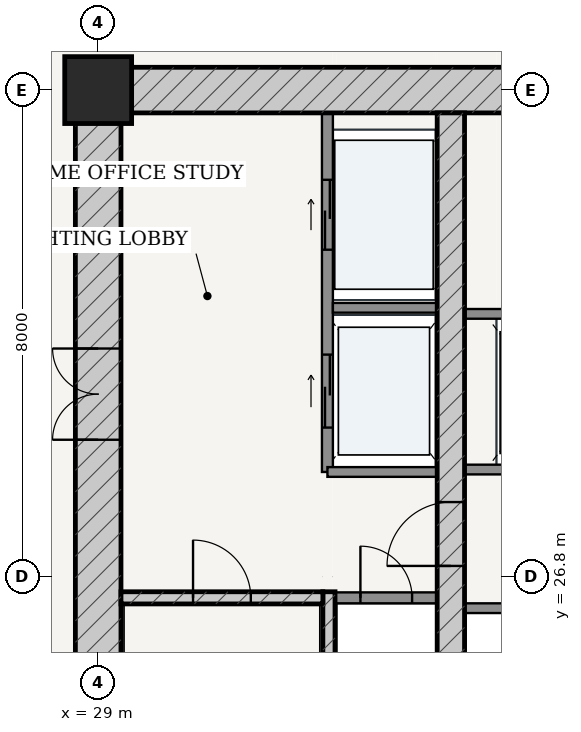
"""IFC4 building model, lengths in metres.
Left out: names, types, materials, properties, quantities, classifications, styles, units other than length and angle.
Written with IfcOpenShell. Run it as: python <this file> out.ifc"""

import sys

from ifc_helpers import new_model, si_unit, direction, frame, frame_2d, origin, origin_2d, place, context, subcontext, project, spatial, rectangle, extrude, source, transform, mapped, element, fill, save


model = new_model("IFC4")
c1 = context("Model", 3, precision=1e-05, world=origin(), true_north=direction((-0.2419218956, 0.970295726276)))
c2 = subcontext(c1, "Body", "Model", "MODEL_VIEW")
j1 = project(units=[si_unit("LENGTHUNIT", "METRE"), si_unit("PLANEANGLEUNIT", "RADIAN")], contexts=[c1])
p1 = place(None, origin())
s1 = spatial("IfcSite", under=j1, at=p1, CompositionType="ELEMENT")
p2 = place(p1, origin())
s2 = spatial("IfcBuilding", under=s1, at=p2, CompositionType="ELEMENT")
p3 = place(p2, frame((0.0, 0.0, 42.0)))
s3 = spatial("IfcBuildingStorey", under=s2, at=p3, CompositionType="ELEMENT", Elevation=42.0)
p4 = place(p3, frame((29.0, 34.8, 0.0), z_axis=(0.0, 0.0, 1.0), x_axis=(1.0, 0.0, 0.0)))
e1 = element("IfcColumn", 1, at=p4, inside=s3, PredefinedType="COLUMN", context=c2, shape_type="SweptSolid", body=[
    extrude(rectangle(XDim=1.1, YDim=1.1, at=origin_2d()), origin(), (0.0, 0.0, 1.0), 3.6),
])
p5 = place(p3, frame((28.625, 34.8, 0.0), z_axis=(0.0, 0.0, 1.0), x_axis=(1.0, 0.0, 0.0)))
e2 = element("IfcWall", 2, at=p5, inside=s3, PredefinedType="SHEAR", context=c2, shape_type="SweptSolid", body=[
    extrude(rectangle(XDim=18.75, YDim=0.75, at=frame_2d((9.375, 0.0))), origin(), (0.0, 0.0, 1.0), 3.32),
])
p6 = place(p5, frame((7.407, 0.0, 0.0)))
e3 = element("IfcOpeningElement", 3, at=p6, cuts=e2, PredefinedType="OPENING", context=c2, shape_type="SweptSolid", body=[
    extrude(rectangle(XDim=0.86, YDim=2.1, at=frame_2d((0.43, 1.05))), frame((0.0, 0.385, 0.0), z_axis=(0.0, -1.0, 0.0), x_axis=(1.0, 0.0, 0.0)), (0.0, 0.0, 1.0), 0.77),
])
p7 = place(p5, frame((10.488, 0.0, 0.0)))
e4 = element("IfcOpeningElement", 4, at=p7, cuts=e2, PredefinedType="OPENING", context=c2, shape_type="SweptSolid", body=[
    extrude(rectangle(XDim=0.85, YDim=2.1, at=frame_2d((0.425, 1.05))), frame((0.0, 0.385, 0.0), z_axis=(0.0, -1.0, 0.0), x_axis=(1.0, 0.0, 0.0)), (0.0, 0.0, 1.0), 0.77),
])
p8 = place(p3, frame((29.0, 19.175, 0.0), z_axis=(0.0, 0.0, 1.0), x_axis=(0.0, 1.0, 0.0)))
e5 = element("IfcWall", 5, at=p8, inside=s3, PredefinedType="SHEAR", context=c2, shape_type="SweptSolid", body=[
    extrude(rectangle(XDim=15.25, YDim=0.75, at=frame_2d((7.625, 0.0))), origin(), (0.0, 0.0, 1.0), 3.32),
])
p9 = place(p8, frame((9.875, 0.0, 0.0)))
e6 = element("IfcOpeningElement", 6, at=p9, cuts=e5, PredefinedType="OPENING", context=c2, shape_type="SweptSolid", body=[
    extrude(rectangle(XDim=1.5, YDim=2.2, at=frame_2d((0.75, 1.1))), frame((0.0, 0.385, 0.0), z_axis=(0.0, -1.0, 0.0), x_axis=(1.0, 0.0, 0.0)), (0.0, 0.0, 1.0), 0.77),
])
p10 = place(p3, frame((32.795, 19.175, 0.0), z_axis=(0.0, 0.0, 1.0), x_axis=(0.0, 1.0, 0.0)))
e7 = element("IfcWall", 7, at=p10, inside=s3, PredefinedType="SOLIDWALL", context=c2, shape_type="SweptSolid", body=[
    extrude(rectangle(XDim=7.375, YDim=0.2, at=frame_2d((3.688, 0.0))), origin(), (0.0, 0.0, 1.0), 3.32),
])
p11 = place(p3, frame((29.375, 26.45, 0.0), z_axis=(0.0, 0.0, 1.0), x_axis=(1.0, 0.0, 0.0)))
e8 = element("IfcWall", 8, at=p11, inside=s3, PredefinedType="SOLIDWALL", context=c2, shape_type="SweptSolid", body=[
    extrude(rectangle(XDim=3.32, YDim=0.2, at=frame_2d((1.66, 0.0))), origin(), (0.0, 0.0, 1.0), 3.32),
])
p12 = place(p11, frame((1.185, 0.0, 0.0)))
e9 = element("IfcOpeningElement", 9, at=p12, cuts=e8, PredefinedType="OPENING", context=c2, shape_type="SweptSolid", body=[
    extrude(rectangle(XDim=0.95, YDim=2.15, at=frame_2d((0.475, 1.075))), frame((0.0, 0.11, 0.0), z_axis=(0.0, -1.0, 0.0), x_axis=(1.0, 0.0, 0.0)), (0.0, 0.0, 1.0), 0.22),
])
p13 = place(p3, frame((34.8, 19.175, 0.0), z_axis=(0.0, 0.0, 1.0), x_axis=(0.0, 1.0, 0.0)))
e10 = element("IfcWall", 10, at=p13, inside=s3, PredefinedType="SHEAR", context=c2, shape_type="SweptSolid", body=[
    extrude(rectangle(XDim=15.25, YDim=0.45, at=frame_2d((7.625, 0.0))), origin(), (0.0, 0.0, 1.0), 3.32),
])
p14 = place(p13, frame((7.8, 0.0, 0.0)))
e11 = element("IfcOpeningElement", 11, at=p14, cuts=e10, PredefinedType="OPENING", context=c2, shape_type="SweptSolid", body=[
    extrude(rectangle(XDim=1.05, YDim=2.15, at=frame_2d((0.525, 1.075))), frame((0.0, 0.235, 0.0), z_axis=(0.0, -1.0, 0.0), x_axis=(1.0, 0.0, 0.0)), (0.0, 0.0, 1.0), 0.47),
])
p15 = place(p3, frame((32.9, 26.45, 0.0), z_axis=(0.0, 0.0, 1.0), x_axis=(1.0, 0.0, 0.0)))
e12 = element("IfcWall", 12, at=p15, inside=s3, PredefinedType="PARTITIONING", context=c2, shape_type="SweptSolid", body=[
    extrude(rectangle(XDim=1.675, YDim=0.18, at=frame_2d((0.837, 0.0))), origin(), (0.0, 0.0, 1.0), 3.32),
])
p16 = place(p15, frame((0.413, 0.0, 0.0)))
e13 = element("IfcOpeningElement", 13, at=p16, cuts=e12, PredefinedType="OPENING", context=c2, shape_type="SweptSolid", body=[
    extrude(rectangle(XDim=0.85, YDim=2.1, at=frame_2d((0.425, 1.05))), frame((0.0, 0.1, 0.0), z_axis=(0.0, -1.0, 0.0), x_axis=(1.0, 0.0, 0.0)), (0.0, 0.0, 1.0), 0.2),
])
p17 = place(p3, frame((32.77, 28.52, 0.0), z_axis=(0.0, 0.0, 1.0), x_axis=(0.0, 1.0, 0.0)))
e14 = element("IfcWall", 14, at=p17, inside=s3, PredefinedType="PARTITIONING", context=c2, shape_type="SweptSolid", body=[
    extrude(rectangle(XDim=5.905, YDim=0.18, at=frame_2d((2.953, 0.0))), origin(), (0.0, 0.0, 1.0), 3.32),
])
p18 = place(p17, frame((3.655, 0.0, 0.0)))
e15 = element("IfcOpeningElement", 15, at=p18, cuts=e14, PredefinedType="OPENING", context=c2, shape_type="SweptSolid", body=[
    extrude(rectangle(XDim=1.15, YDim=2.2, at=frame_2d((0.575, 1.1))), frame((0.0, 0.1, 0.0), z_axis=(0.0, -1.0, 0.0), x_axis=(1.0, 0.0, 0.0)), (0.0, 0.0, 1.0), 0.2),
])
p19 = place(p17, frame((0.73, 0.0, 0.0)))
e16 = element("IfcOpeningElement", 16, at=p19, cuts=e14, PredefinedType="OPENING", context=c2, shape_type="SweptSolid", body=[
    extrude(rectangle(XDim=1.2, YDim=2.25, at=frame_2d((0.6, 1.125))), frame((0.0, 0.1, 0.0), z_axis=(0.0, -1.0, 0.0), x_axis=(1.0, 0.0, 0.0)), (0.0, 0.0, 1.0), 0.2),
])
p20 = place(p3, frame((32.86, 31.22, 0.0), z_axis=(0.0, 0.0, 1.0), x_axis=(1.0, 0.0, 0.0)))
e17 = element("IfcWall", 17, at=p20, inside=s3, PredefinedType="PARTITIONING", context=c2, shape_type="SweptSolid", body=[
    extrude(rectangle(XDim=1.715, YDim=0.16, at=frame_2d((0.857, 0.0))), origin(), (0.0, 0.0, 1.0), 3.32),
])
p21 = place(p3, frame((32.77, 28.52, 0.0), z_axis=(0.0, 0.0, 1.0), x_axis=(1.0, 0.0, 0.0)))
e18 = element("IfcWall", 18, at=p21, inside=s3, PredefinedType="PARTITIONING", context=c2, shape_type="SweptSolid", body=[
    extrude(rectangle(XDim=1.805, YDim=0.16, at=frame_2d((0.902, 0.0))), origin(), (0.0, 0.0, 1.0), 3.32),
])
p22 = place(p3, frame((35.025, 28.56, 0.0), z_axis=(0.0, 0.0, 1.0), x_axis=(1.0, 0.0, 0.0)))
e19 = element("IfcWall", 19, at=p22, inside=s3, PredefinedType="PARTITIONING", context=c2, shape_type="SweptSolid", body=[
    extrude(rectangle(XDim=5.95, YDim=0.16, at=frame_2d((2.975, 0.0))), origin(), (0.0, 0.0, 1.0), 3.32),
])
p23 = place(p22, frame((0.76, 0.0, 0.0)))
e20 = element("IfcOpeningElement", 20, at=p23, cuts=e19, PredefinedType="OPENING", context=c2, shape_type="SweptSolid", body=[
    extrude(rectangle(XDim=1.1, YDim=2.2, at=frame_2d((0.55, 1.1))), frame((0.0, 0.09, 0.0), z_axis=(0.0, -1.0, 0.0), x_axis=(1.0, 0.0, 0.0)), (0.0, 0.0, 1.0), 0.18),
])
p24 = place(p22, frame((2.425, 0.0, 0.0)))
e21 = element("IfcOpeningElement", 21, at=p24, cuts=e19, PredefinedType="OPENING", context=c2, shape_type="SweptSolid", body=[
    extrude(rectangle(XDim=1.1, YDim=2.2, at=frame_2d((0.55, 1.1))), frame((0.0, 0.09, 0.0), z_axis=(0.0, -1.0, 0.0), x_axis=(1.0, 0.0, 0.0)), (0.0, 0.0, 1.0), 0.18),
])
p25 = place(p22, frame((4.09, 0.0, 0.0)))
e22 = element("IfcOpeningElement", 22, at=p25, cuts=e19, PredefinedType="OPENING", context=c2, shape_type="SweptSolid", body=[
    extrude(rectangle(XDim=1.1, YDim=2.2, at=frame_2d((0.55, 1.1))), frame((0.0, 0.09, 0.0), z_axis=(0.0, -1.0, 0.0), x_axis=(1.0, 0.0, 0.0)), (0.0, 0.0, 1.0), 0.18),
])
for number, where, z_axis, x_axis in (
    (23, (35.025, 31.12, 0.0), (0.0, 0.0, 1.0), (1.0, 0.0, 0.0)),
    (24, (35.025, 26.28, 0.0), (0.0, 0.0, 1.0), (1.0, 0.0, 0.0)),
):
    element("IfcWall", number, at=place(p3, frame(where, z_axis=z_axis, x_axis=x_axis)), inside=s3, PredefinedType="PARTITIONING", context=c2, shape_type="SweptSolid", body=[
        extrude(rectangle(XDim=5.95, YDim=0.16, at=frame_2d((2.975, 0.0))), origin(), (0.0, 0.0, 1.0), 3.32),
    ])
m1 = source(origin(), c2, "Body", "SweptSolid", [
    extrude(rectangle(XDim=1.5, YDim=2.2, at=frame_2d((0.75, 1.1))), frame((0.0, 0.025, 0.0), z_axis=(0.0, -1.0, 0.0), x_axis=(1.0, 0.0, 0.0)), (0.0, 0.0, 1.0), 0.05),
])
p26 = place(p9, origin())
e25 = element("IfcDoor", 25, at=p26, inside=s3, OperationType="DOUBLE_DOOR_SINGLE_SWING", PredefinedType="DOOR", context=c2, shape_type="MappedRepresentation", body=[
    mapped(m1, transform((0.0, 0.0, 0.0), scale=1.0)),
])
fill(e6, e25)
m2 = source(origin(), c2, "Body", "SweptSolid", [
    extrude(rectangle(XDim=1.05, YDim=2.15, at=frame_2d((0.525, 1.075))), frame((0.0, 0.025, 0.0), z_axis=(0.0, -1.0, 0.0), x_axis=(1.0, 0.0, 0.0)), (0.0, 0.0, 1.0), 0.05),
])
p27 = place(p14, origin())
e26 = element("IfcDoor", 26, at=p27, inside=s3, OperationType="SINGLE_SWING_LEFT", PredefinedType="DOOR", context=c2, shape_type="MappedRepresentation", body=[
    mapped(m2, transform((0.0, 0.0, 0.0), scale=1.0)),
])
fill(e11, e26)
m3 = source(origin(), c2, "Body", "SweptSolid", [
    extrude(rectangle(XDim=0.95, YDim=2.15, at=frame_2d((0.475, 1.075))), frame((0.0, 0.025, 0.0), z_axis=(0.0, -1.0, 0.0), x_axis=(1.0, 0.0, 0.0)), (0.0, 0.0, 1.0), 0.05),
])
p28 = place(p12, origin())
e27 = element("IfcDoor", 27, at=p28, inside=s3, OperationType="SINGLE_SWING_LEFT", PredefinedType="DOOR", context=c2, shape_type="MappedRepresentation", body=[
    mapped(m3, transform((0.0, 0.0, 0.0), scale=1.0)),
])
fill(e9, e27)
m4 = source(origin(), c2, "Body", "SweptSolid", [
    extrude(rectangle(XDim=0.85, YDim=2.1, at=frame_2d((0.425, 1.05))), frame((0.0, 0.025, 0.0), z_axis=(0.0, -1.0, 0.0), x_axis=(1.0, 0.0, 0.0)), (0.0, 0.0, 1.0), 0.05),
])
p29 = place(p16, origin())
e28 = element("IfcDoor", 28, at=p29, inside=s3, OperationType="SINGLE_SWING_LEFT", PredefinedType="DOOR", context=c2, shape_type="MappedRepresentation", body=[
    mapped(m4, transform((0.0, 0.0, 0.0), scale=1.0)),
])
fill(e13, e28)
m5 = source(origin(), c2, "Body", "SweptSolid", [
    extrude(rectangle(XDim=1.15, YDim=2.2, at=frame_2d((0.575, 1.1))), frame((0.0, 0.025, 0.0), z_axis=(0.0, -1.0, 0.0), x_axis=(1.0, 0.0, 0.0)), (0.0, 0.0, 1.0), 0.05),
])
p30 = place(p18, origin())
e29 = element("IfcDoor", 29, at=p30, inside=s3, OperationType="DOUBLE_DOOR_SLIDING", PredefinedType="DOOR", context=c2, shape_type="MappedRepresentation", body=[
    mapped(m5, transform((0.0, 0.0, 0.0), scale=1.0)),
])
fill(e15, e29)
m6 = source(origin(), c2, "Body", "SweptSolid", [
    extrude(rectangle(XDim=1.2, YDim=2.25, at=frame_2d((0.6, 1.125))), frame((0.0, 0.025, 0.0), z_axis=(0.0, -1.0, 0.0), x_axis=(1.0, 0.0, 0.0)), (0.0, 0.0, 1.0), 0.05),
])
p31 = place(p19, origin())
e30 = element("IfcDoor", 30, at=p31, inside=s3, OperationType="DOUBLE_DOOR_SLIDING", PredefinedType="DOOR", context=c2, shape_type="MappedRepresentation", body=[
    mapped(m6, transform((0.0, 0.0, 0.0), scale=1.0)),
])
fill(e16, e30)
save(model, sys.argv[1])
